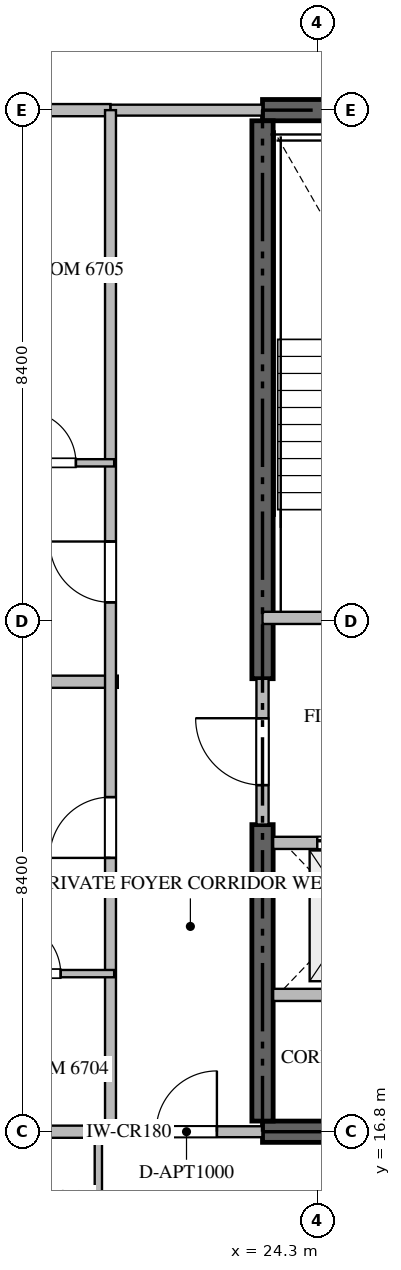
"""IFC4 building model, lengths in metres.
Left out: names, types, materials, properties, quantities, classifications, styles, units other than length and angle.
Written with IfcOpenShell. Run it as: python <this file> out.ifc"""

import sys

from ifc_helpers import new_model, si_unit, direction, frame, frame_2d, origin, place, context, subcontext, project, spatial, rectangle, extrude, source, transform, mapped, element, fill, save


model = new_model("IFC4")
c1 = context("Model", 3, precision=1e-05, world=origin(), true_north=direction((0.0, 1.0)))
c2 = subcontext(c1, "Body", "Model", "MODEL_VIEW")
j1 = project(units=[si_unit("LENGTHUNIT", "METRE"), si_unit("PLANEANGLEUNIT", "RADIAN")], contexts=[c1])
p1 = place(None, origin())
s1 = spatial("IfcSite", under=j1, at=p1, CompositionType="ELEMENT")
p2 = place(p1, origin())
s2 = spatial("IfcBuilding", under=s1, at=p2, CompositionType="ELEMENT")
p3 = place(p2, frame((0.0, 0.0, 268.2)))
s3 = spatial("IfcBuildingStorey", under=s2, at=p3, CompositionType="ELEMENT", Elevation=268.2)
for number, where, z_axis, x_axis in (
    (1, (23.4, 16.8, -0.26), (0.0, 0.0, 1.0), (1.0, 0.0, 0.0)),
    (2, (41.4, 33.6, -0.26), (0.0, 0.0, 1.0), (-1.0, 0.0, 0.0)),
):
    element("IfcWall", number, at=place(p3, frame(where, z_axis=z_axis, x_axis=x_axis)), inside=s3, PredefinedType="SHEAR", context=c2, shape_type="SweptSolid", body=[
        extrude(rectangle(XDim=18.0, YDim=0.35, at=frame_2d((9.0, 0.0))), origin(), (0.0, 0.0, 1.0), 3.848),
    ])
p4 = place(p3, frame((23.4, 16.975, -0.26), z_axis=(0.0, 0.0, 1.0), x_axis=(0.0, 1.0, 0.0)))
e3 = element("IfcWall", 3, at=p4, inside=s3, PredefinedType="SHEAR", context=c2, shape_type="SweptSolid", body=[
    extrude(rectangle(XDim=4.875, YDim=0.35, at=frame_2d((2.438, 0.0))), origin(), (0.0, 0.0, 1.0), 3.848),
])
p5 = place(p3, frame((23.4, 24.25, -0.26), z_axis=(0.0, 0.0, 1.0), x_axis=(0.0, 1.0, 0.0)))
e4 = element("IfcWall", 4, at=p5, inside=s3, PredefinedType="SHEAR", context=c2, shape_type="SweptSolid", body=[
    extrude(rectangle(XDim=9.175, YDim=0.35, at=frame_2d((4.587, 0.0))), origin(), (0.0, 0.0, 1.0), 3.848),
])
p6 = place(p3, frame((23.4, 25.25, 0.0), z_axis=(0.0, 0.0, 1.0), x_axis=(1.0, 0.0, 0.0)))
e5 = element("IfcWall", 5, at=p6, inside=s3, PredefinedType="STANDARD", context=c2, shape_type="SweptSolid", body=[
    extrude(rectangle(XDim=4.45, YDim=0.2, at=frame_2d((2.225, 0.0))), origin(), (0.0, 0.0, 1.0), 3.59),
])
p7 = place(p6, frame((1.65, 0.0, 0.0)))
e6 = element("IfcOpeningElement", 6, at=p7, cuts=e5, PredefinedType="OPENING", context=c2, shape_type="SweptSolid", body=[
    extrude(rectangle(XDim=1.1, YDim=2.15, at=frame_2d((0.55, 1.075))), frame((0.0, 0.11, 0.0), z_axis=(0.0, -1.0, 0.0), x_axis=(1.0, 0.0, 0.0)), (0.0, 0.0, 1.0), 0.22),
])
p8 = place(p3, frame((23.575, 21.55, 0.0), z_axis=(0.0, 0.0, 1.0), x_axis=(1.0, 0.0, 0.0)))
e7 = element("IfcWall", 7, at=p8, inside=s3, PredefinedType="STANDARD", context=c2, shape_type="SweptSolid", body=[
    extrude(rectangle(XDim=2.475, YDim=0.2, at=frame_2d((1.238, 0.0))), origin(), (0.0, 0.0, 1.0), 3.59),
])
p9 = place(p8, frame((0.725, 0.0, 0.0)))
e8 = element("IfcOpeningElement", 8, at=p9, cuts=e7, PredefinedType="OPENING", context=c2, shape_type="SweptSolid", body=[
    extrude(rectangle(XDim=1.2, YDim=2.2, at=frame_2d((0.6, 1.1))), frame((0.0, 0.11, 0.0), z_axis=(0.0, -1.0, 0.0), x_axis=(1.0, 0.0, 0.0)), (0.0, 0.0, 1.0), 0.22),
])
p10 = place(p3, frame((23.575, 19.05, 0.0), z_axis=(0.0, 0.0, 1.0), x_axis=(1.0, 0.0, 0.0)))
e9 = element("IfcWall", 9, at=p10, inside=s3, PredefinedType="STANDARD", context=c2, shape_type="SweptSolid", body=[
    extrude(rectangle(XDim=2.475, YDim=0.2, at=frame_2d((1.238, 0.0))), origin(), (0.0, 0.0, 1.0), 3.59),
])
p11 = place(p3, frame((23.4, 21.852, 0.0), z_axis=(0.0, 0.0, 1.0), x_axis=(0.0, 1.0, 0.0)))
e10 = element("IfcWall", 10, at=p11, inside=s3, PredefinedType="STANDARD", context=c2, shape_type="SweptSolid", body=[
    extrude(rectangle(XDim=2.396, YDim=0.2, at=frame_2d((1.198, 0.0))), origin(), (0.0, 0.0, 1.0), 3.59),
])
p12 = place(p11, frame((0.648, 0.0, 0.0)))
e11 = element("IfcOpeningElement", 11, at=p12, cuts=e10, PredefinedType="OPENING", context=c2, shape_type="SweptSolid", body=[
    extrude(rectangle(XDim=1.1, YDim=2.15, at=frame_2d((0.55, 1.075))), frame((0.0, 0.11, 0.0), z_axis=(0.0, -1.0, 0.0), x_axis=(1.0, 0.0, 0.0)), (0.0, 0.0, 1.0), 0.22),
])
p13 = place(p3, frame((7.482, 24.2, 0.0), z_axis=(0.0, 0.0, 1.0), x_axis=(1.0, 0.0, 0.0)))
e12 = element("IfcWall", 12, at=p13, inside=s3, PredefinedType="PARTITIONING", context=c2, shape_type="SweptSolid", body=[
    extrude(rectangle(XDim=13.538, YDim=0.2, at=frame_2d((6.769, 0.0))), origin(), (0.0, 0.0, 1.0), 3.59),
])
for number, where, z_axis, x_axis in (
    (13, (7.482, 16.8, 0.0), (0.0, 0.0, 1.0), (1.0, 0.0, 0.0)),
    (14, (7.482, 33.6, 0.0), (0.0, 0.0, 1.0), (1.0, 0.0, 0.0)),
):
    element("IfcWall", number, at=place(p3, frame(where, z_axis=z_axis, x_axis=x_axis)), inside=s3, PredefinedType="PARTITIONING", context=c2, shape_type="SweptSolid", body=[
        extrude(rectangle(XDim=13.418, YDim=0.2, at=frame_2d((6.709, 0.0))), origin(), (0.0, 0.0, 1.0), 3.59),
    ])
p14 = place(p3, frame((20.902, 16.8, 0.0), z_axis=(0.0, 0.0, 1.0), x_axis=(1.0, 0.0, 0.0)))
e15 = element("IfcWall", 15, at=p14, inside=s3, PredefinedType="PARTITIONING", context=c2, shape_type="SweptSolid", body=[
    extrude(rectangle(XDim=2.496, YDim=0.18, at=frame_2d((1.248, 0.0))), origin(), (0.0, 0.0, 1.0), 3.59),
])
p15 = place(p14, frame((0.748, 0.0, 0.0)))
e16 = element("IfcOpeningElement", 16, at=p15, cuts=e15, PredefinedType="OPENING", context=c2, shape_type="SweptSolid", body=[
    extrude(rectangle(XDim=1.0, YDim=2.15, at=frame_2d((0.5, 1.075))), frame((0.0, 0.1, 0.0), z_axis=(0.0, -1.0, 0.0), x_axis=(1.0, 0.0, 0.0)), (0.0, 0.0, 1.0), 0.2),
])
p16 = place(p3, frame((20.902, 33.6, 0.0), z_axis=(0.0, 0.0, 1.0), x_axis=(1.0, 0.0, 0.0)))
e17 = element("IfcWall", 17, at=p16, inside=s3, PredefinedType="PARTITIONING", context=c2, shape_type="SweptSolid", body=[
    extrude(rectangle(XDim=2.496, YDim=0.18, at=frame_2d((1.248, 0.0))), origin(), (0.0, 0.0, 1.0), 3.59),
])
p17 = place(p3, frame((20.9, 16.8, 0.0), z_axis=(0.0, 0.0, 1.0), x_axis=(0.0, 1.0, 0.0)))
e18 = element("IfcWall", 18, at=p17, inside=s3, PredefinedType="PARTITIONING", context=c2, shape_type="SweptSolid", body=[
    extrude(rectangle(XDim=16.8, YDim=0.18, at=frame_2d((8.4, 0.0))), origin(), (0.0, 0.0, 1.0), 3.59),
])
p18 = place(p17, frame((4.503, 0.0, 0.0)))
e19 = element("IfcOpeningElement", 19, at=p18, cuts=e18, PredefinedType="OPENING", context=c2, shape_type="SweptSolid", body=[
    extrude(rectangle(XDim=1.0, YDim=2.15, at=frame_2d((0.5, 1.075))), frame((0.0, 0.1, 0.0), z_axis=(0.0, -1.0, 0.0), x_axis=(1.0, 0.0, 0.0)), (0.0, 0.0, 1.0), 0.2),
])
p19 = place(p17, frame((8.706, 0.0, 0.0)))
e20 = element("IfcOpeningElement", 20, at=p19, cuts=e18, PredefinedType="OPENING", context=c2, shape_type="SweptSolid", body=[
    extrude(rectangle(XDim=1.0, YDim=2.15, at=frame_2d((0.5, 1.075))), frame((0.0, 0.1, 0.0), z_axis=(0.0, -1.0, 0.0), x_axis=(1.0, 0.0, 0.0)), (0.0, 0.0, 1.0), 0.2),
])
p20 = place(p3, frame((20.7, 14.05, 0.0), z_axis=(0.0, 0.0, 1.0), x_axis=(0.0, 1.0, 0.0)))
e21 = element("IfcWall", 21, at=p20, inside=s3, PredefinedType="PARTITIONING", context=c2, shape_type="SweptSolid", body=[
    extrude(rectangle(XDim=2.81, YDim=0.12, at=frame_2d((1.405, 0.0))), origin(), (0.0, 0.0, 1.0), 3.59),
])
p21 = place(p3, frame((18.352, 19.4, 0.0), z_axis=(0.0, 0.0, 1.0), x_axis=(1.0, 0.0, 0.0)))
e22 = element("IfcWall", 22, at=p21, inside=s3, PredefinedType="PARTITIONING", context=c2, shape_type="SweptSolid", body=[
    extrude(rectangle(XDim=2.608, YDim=0.12, at=frame_2d((1.304, 0.0))), origin(), (0.0, 0.0, 1.0), 3.59),
])
p22 = place(p21, frame((0.879, 0.0, 0.0)))
e23 = element("IfcOpeningElement", 23, at=p22, cuts=e22, PredefinedType="OPENING", context=c2, shape_type="SweptSolid", body=[
    extrude(rectangle(XDim=0.85, YDim=2.1, at=frame_2d((0.425, 1.05))), frame((0.0, 0.07, 0.0), z_axis=(0.0, -1.0, 0.0), x_axis=(1.0, 0.0, 0.0)), (0.0, 0.0, 1.0), 0.14),
])
p23 = place(p3, frame((18.852, 27.8, 0.0), z_axis=(0.0, 0.0, 1.0), x_axis=(1.0, 0.0, 0.0)))
e24 = element("IfcWall", 24, at=p23, inside=s3, PredefinedType="PARTITIONING", context=c2, shape_type="SweptSolid", body=[
    extrude(rectangle(XDim=2.108, YDim=0.12, at=frame_2d((1.054, 0.0))), origin(), (0.0, 0.0, 1.0), 3.59),
])
p24 = place(p23, frame((0.629, 0.0, 0.0)))
e25 = element("IfcOpeningElement", 25, at=p24, cuts=e24, PredefinedType="OPENING", context=c2, shape_type="SweptSolid", body=[
    extrude(rectangle(XDim=0.85, YDim=2.1, at=frame_2d((0.425, 1.05))), frame((0.0, 0.07, 0.0), z_axis=(0.0, -1.0, 0.0), x_axis=(1.0, 0.0, 0.0)), (0.0, 0.0, 1.0), 0.14),
])
m1 = source(origin(), c2, "Body", "SweptSolid", [
    extrude(rectangle(XDim=1.2, YDim=2.2, at=frame_2d((0.6, 1.1))), frame((0.0, 0.025, 0.0), z_axis=(0.0, -1.0, 0.0), x_axis=(1.0, 0.0, 0.0)), (0.0, 0.0, 1.0), 0.05),
])
p25 = place(p9, origin())
e26 = element("IfcDoor", 26, at=p25, inside=s3, OperationType="DOUBLE_DOOR_SLIDING", PredefinedType="DOOR", context=c2, shape_type="MappedRepresentation", body=[
    mapped(m1, transform((0.0, 0.0, 0.0), scale=1.0)),
])
fill(e8, e26)
m2 = source(origin(), c2, "Body", "SweptSolid", [
    extrude(rectangle(XDim=1.1, YDim=2.15, at=frame_2d((0.55, 1.075))), frame((0.0, 0.025, 0.0), z_axis=(0.0, -1.0, 0.0), x_axis=(1.0, 0.0, 0.0)), (0.0, 0.0, 1.0), 0.05),
])
p26 = place(p12, origin())
e27 = element("IfcDoor", 27, at=p26, inside=s3, OperationType="SINGLE_SWING_RIGHT", PredefinedType="DOOR", context=c2, shape_type="MappedRepresentation", body=[
    mapped(m2, transform((0.0, 0.0, 0.0), scale=1.0)),
])
fill(e11, e27)
m3 = source(origin(), c2, "Body", "SweptSolid", [
    extrude(rectangle(XDim=1.0, YDim=2.15, at=frame_2d((0.5, 1.075))), frame((0.0, 0.025, 0.0), z_axis=(0.0, -1.0, 0.0), x_axis=(1.0, 0.0, 0.0)), (0.0, 0.0, 1.0), 0.05),
])
p27 = place(p15, origin())
e28 = element("IfcDoor", 28, at=p27, inside=s3, OperationType="SINGLE_SWING_RIGHT", PredefinedType="DOOR", context=c2, shape_type="MappedRepresentation", body=[
    mapped(m3, transform((0.0, 0.0, 0.0), scale=1.0)),
])
fill(e16, e28)
p28 = place(p18, origin())
e29 = element("IfcDoor", 29, at=p28, inside=s3, OperationType="SINGLE_SWING_LEFT", PredefinedType="DOOR", context=c2, shape_type="MappedRepresentation", body=[
    mapped(m3, transform((0.0, 0.0, 0.0), scale=1.0)),
])
fill(e19, e29)
p29 = place(p19, origin())
e30 = element("IfcDoor", 30, at=p29, inside=s3, OperationType="SINGLE_SWING_RIGHT", PredefinedType="DOOR", context=c2, shape_type="MappedRepresentation", body=[
    mapped(m3, transform((0.0, 0.0, 0.0), scale=1.0)),
])
fill(e20, e30)
m4 = source(origin(), c2, "Body", "SweptSolid", [
    extrude(rectangle(XDim=0.85, YDim=2.1, at=frame_2d((0.425, 1.05))), frame((0.0, 0.025, 0.0), z_axis=(0.0, -1.0, 0.0), x_axis=(1.0, 0.0, 0.0)), (0.0, 0.0, 1.0), 0.05),
])
p30 = place(p22, origin())
e31 = element("IfcDoor", 31, at=p30, inside=s3, OperationType="SINGLE_SWING_LEFT", PredefinedType="DOOR", context=c2, shape_type="MappedRepresentation", body=[
    mapped(m4, transform((0.0, 0.0, 0.0), scale=1.0)),
])
fill(e23, e31)
p31 = place(p24, origin())
e32 = element("IfcDoor", 32, at=p31, inside=s3, OperationType="SINGLE_SWING_LEFT", PredefinedType="DOOR", context=c2, shape_type="MappedRepresentation", body=[
    mapped(m4, transform((0.0, 0.0, 0.0), scale=1.0)),
])
fill(e25, e32)
save(model, sys.argv[1])
